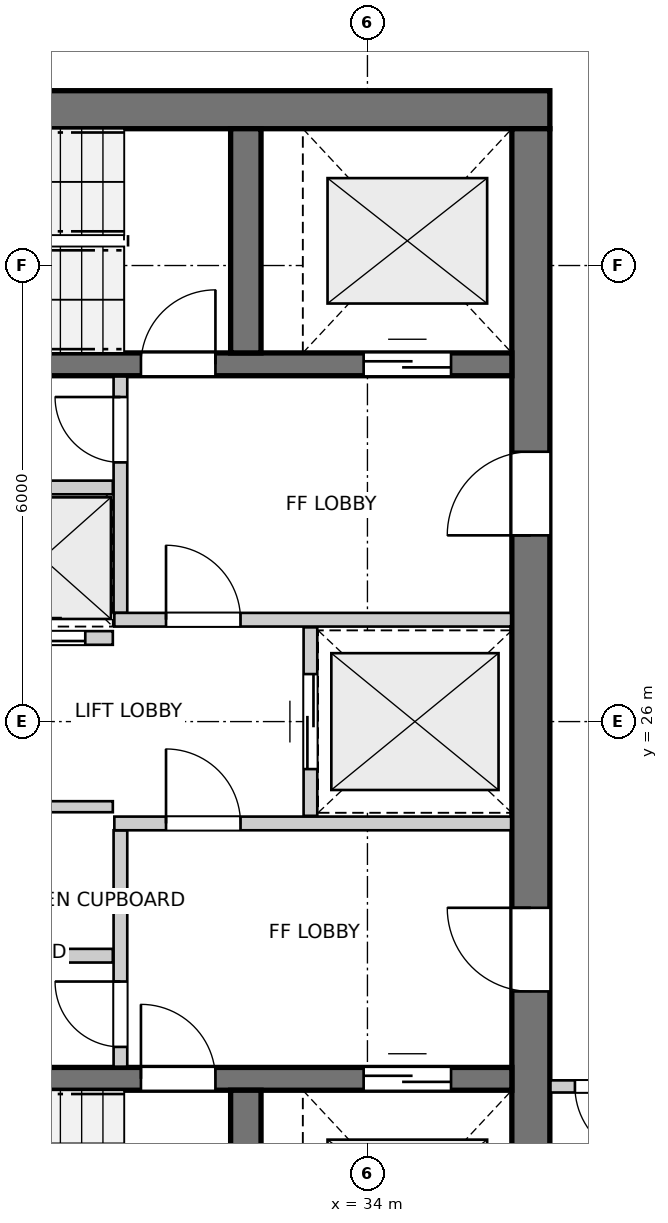
"""IFC4 building model, lengths in metres.
Left out: names, types, materials, properties, quantities, classifications, styles, units other than length and angle.
Written with IfcOpenShell. Run it as: python <this file> out.ifc"""

import sys

from ifc_helpers import new_model, si_unit, direction, frame, frame_2d, origin, place, context, subcontext, project, spatial, rectangle, extrude, source, transform, mapped, element, fill, save


model = new_model("IFC4")
c1 = context("Model", 3, precision=1e-05, world=origin(), true_north=direction((0.0, 1.0)))
c2 = subcontext(c1, "Body", "Model", "MODEL_VIEW")
j1 = project(units=[si_unit("LENGTHUNIT", "METRE"), si_unit("PLANEANGLEUNIT", "RADIAN")], contexts=[c1])
p1 = place(None, origin())
s1 = spatial("IfcSite", under=j1, at=p1, CompositionType="ELEMENT")
p2 = place(p1, origin())
s2 = spatial("IfcBuilding", under=s1, at=p2, CompositionType="ELEMENT")
p3 = place(p2, frame((0.0, 0.0, 227.6)))
s3 = spatial("IfcBuildingStorey", under=s2, at=p3, CompositionType="ELEMENT", Elevation=227.6)
p4 = place(p3, frame((36.4, 34.05, 0.0), z_axis=(0.0, 0.0, 1.0), x_axis=(-1.0, 0.0, 0.0)))
e1 = element("IfcWall", 1, at=p4, inside=s3, PredefinedType="SHEAR", context=c2, shape_type="SweptSolid", body=[
    extrude(rectangle(XDim=12.1, YDim=0.5, at=frame_2d((6.05, 0.0))), origin(), (0.0, 0.0, 1.0), 2.96),
])
p5 = place(p3, frame((36.15, 18.2, 0.0), z_axis=(0.0, 0.0, 1.0), x_axis=(0.0, 1.0, 0.0)))
e2 = element("IfcWall", 2, at=p5, inside=s3, PredefinedType="SHEAR", context=c2, shape_type="SweptSolid", body=[
    extrude(rectangle(XDim=15.6, YDim=0.5, at=frame_2d((7.8, 0.0))), origin(), (0.0, 0.0, 1.0), 2.96),
])
p6 = place(p5, frame((4.25, 0.0, 0.0)))
e3 = element("IfcOpeningElement", 3, at=p6, cuts=e2, PredefinedType="OPENING", context=c2, shape_type="SweptSolid", body=[
    extrude(rectangle(XDim=1.1, YDim=2.15, at=frame_2d((0.55, 1.075))), frame((0.0, 0.26, 0.0), z_axis=(0.0, -1.0, 0.0), x_axis=(1.0, 0.0, 0.0)), (0.0, 0.0, 1.0), 0.52),
])
p7 = place(p5, frame((10.25, 0.0, 0.0)))
e4 = element("IfcOpeningElement", 4, at=p7, cuts=e2, PredefinedType="OPENING", context=c2, shape_type="SweptSolid", body=[
    extrude(rectangle(XDim=1.1, YDim=2.15, at=frame_2d((0.55, 1.075))), frame((0.0, 0.26, 0.0), z_axis=(0.0, -1.0, 0.0), x_axis=(1.0, 0.0, 0.0)), (0.0, 0.0, 1.0), 0.52),
])
p8 = place(p3, frame((24.8, 21.3, 0.0), z_axis=(0.0, 0.0, 1.0), x_axis=(1.0, 0.0, 0.0)))
e5 = element("IfcWall", 5, at=p8, inside=s3, PredefinedType="SHEAR", context=c2, shape_type="SweptSolid", body=[
    extrude(rectangle(XDim=11.1, YDim=0.3, at=frame_2d((5.55, 0.0))), origin(), (0.0, 0.0, 1.0), 2.96),
])
p9 = place(p8, frame((6.22, 0.0, 0.0)))
e6 = element("IfcOpeningElement", 6, at=p9, cuts=e5, PredefinedType="OPENING", context=c2, shape_type="SweptSolid", body=[
    extrude(rectangle(XDim=0.98, YDim=2.15, at=frame_2d((0.49, 1.075))), frame((0.0, 0.16, 0.0), z_axis=(0.0, -1.0, 0.0), x_axis=(1.0, 0.0, 0.0)), (0.0, 0.0, 1.0), 0.32),
])
p10 = place(p8, frame((9.15, 0.0, 0.0)))
e7 = element("IfcOpeningElement", 7, at=p10, cuts=e5, PredefinedType="OPENING", context=c2, shape_type="SweptSolid", body=[
    extrude(rectangle(XDim=1.15, YDim=2.15, at=frame_2d((0.575, 1.075))), frame((0.0, 0.16, 0.0), z_axis=(0.0, -1.0, 0.0), x_axis=(1.0, 0.0, 0.0)), (0.0, 0.0, 1.0), 0.32),
])
p11 = place(p3, frame((32.4, 18.2, 0.0), z_axis=(0.0, 0.0, 1.0), x_axis=(0.0, 1.0, 0.0)))
e8 = element("IfcWall", 8, at=p11, inside=s3, PredefinedType="SHEAR", context=c2, shape_type="SweptSolid", body=[
    extrude(rectangle(XDim=2.95, YDim=0.4, at=frame_2d((1.475, 0.0))), origin(), (0.0, 0.0, 1.0), 2.96),
])
p12 = place(p3, frame((24.8, 30.7, 0.0), z_axis=(0.0, 0.0, 1.0), x_axis=(1.0, 0.0, 0.0)))
e9 = element("IfcWall", 9, at=p12, inside=s3, PredefinedType="SHEAR", context=c2, shape_type="SweptSolid", body=[
    extrude(rectangle(XDim=11.1, YDim=0.3, at=frame_2d((5.55, 0.0))), origin(), (0.0, 0.0, 1.0), 2.96),
])
p13 = place(p12, frame((6.22, 0.0, 0.0)))
e10 = element("IfcOpeningElement", 10, at=p13, cuts=e9, PredefinedType="OPENING", context=c2, shape_type="SweptSolid", body=[
    extrude(rectangle(XDim=0.98, YDim=2.15, at=frame_2d((0.49, 1.075))), frame((0.0, 0.16, 0.0), z_axis=(0.0, -1.0, 0.0), x_axis=(1.0, 0.0, 0.0)), (0.0, 0.0, 1.0), 0.32),
])
p14 = place(p12, frame((9.15, 0.0, 0.0)))
e11 = element("IfcOpeningElement", 11, at=p14, cuts=e9, PredefinedType="OPENING", context=c2, shape_type="SweptSolid", body=[
    extrude(rectangle(XDim=1.15, YDim=2.15, at=frame_2d((0.575, 1.075))), frame((0.0, 0.16, 0.0), z_axis=(0.0, -1.0, 0.0), x_axis=(1.0, 0.0, 0.0)), (0.0, 0.0, 1.0), 0.32),
])
p15 = place(p3, frame((32.4, 30.85, 0.0), z_axis=(0.0, 0.0, 1.0), x_axis=(0.0, 1.0, 0.0)))
e12 = element("IfcWall", 12, at=p15, inside=s3, PredefinedType="SHEAR", context=c2, shape_type="SweptSolid", body=[
    extrude(rectangle(XDim=2.95, YDim=0.4, at=frame_2d((1.475, 0.0))), origin(), (0.0, 0.0, 1.0), 2.96),
])
p16 = place(p3, frame((30.75, 21.46, 0.0), z_axis=(0.0, 0.0, 1.0), x_axis=(0.0, 1.0, 0.0)))
e13 = element("IfcWall", 13, at=p16, inside=s3, PredefinedType="PARTITIONING", context=c2, shape_type="SweptSolid", body=[
    extrude(rectangle(XDim=3.11, YDim=0.18, at=frame_2d((1.555, 0.0))), origin(), (0.0, 0.0, 1.0), 2.96),
])
p17 = place(p16, frame((0.26, 0.0, 0.0)))
e14 = element("IfcOpeningElement", 14, at=p17, cuts=e13, PredefinedType="OPENING", context=c2, shape_type="SweptSolid", body=[
    extrude(rectangle(XDim=0.86, YDim=2.05, at=frame_2d((0.43, 1.025))), frame((0.0, 0.1, 0.0), z_axis=(0.0, -1.0, 0.0), x_axis=(1.0, 0.0, 0.0)), (0.0, 0.0, 1.0), 0.2),
])
p18 = place(p3, frame((30.67, 24.66, 0.0), z_axis=(0.0, 0.0, 1.0), x_axis=(1.0, 0.0, 0.0)))
e15 = element("IfcWall", 15, at=p18, inside=s3, PredefinedType="PARTITIONING", context=c2, shape_type="SweptSolid", body=[
    extrude(rectangle(XDim=5.22, YDim=0.18, at=frame_2d((2.61, 0.0))), origin(), (0.0, 0.0, 1.0), 2.96),
])
p19 = place(p18, frame((0.68, 0.0, 0.0)))
e16 = element("IfcOpeningElement", 16, at=p19, cuts=e15, PredefinedType="OPENING", context=c2, shape_type="SweptSolid", body=[
    extrude(rectangle(XDim=0.98, YDim=2.15, at=frame_2d((0.49, 1.075))), frame((0.0, 0.1, 0.0), z_axis=(0.0, -1.0, 0.0), x_axis=(1.0, 0.0, 0.0)), (0.0, 0.0, 1.0), 0.2),
])
p20 = place(p3, frame((30.75, 27.43, 0.0), z_axis=(0.0, 0.0, 1.0), x_axis=(0.0, 1.0, 0.0)))
e17 = element("IfcWall", 17, at=p20, inside=s3, PredefinedType="PARTITIONING", context=c2, shape_type="SweptSolid", body=[
    extrude(rectangle(XDim=3.11, YDim=0.18, at=frame_2d((1.555, 0.0))), origin(), (0.0, 0.0, 1.0), 2.96),
])
p21 = place(p20, frame((1.98, 0.0, 0.0)))
e18 = element("IfcOpeningElement", 18, at=p21, cuts=e17, PredefinedType="OPENING", context=c2, shape_type="SweptSolid", body=[
    extrude(rectangle(XDim=0.86, YDim=2.05, at=frame_2d((0.43, 1.025))), frame((0.0, 0.1, 0.0), z_axis=(0.0, -1.0, 0.0), x_axis=(1.0, 0.0, 0.0)), (0.0, 0.0, 1.0), 0.2),
])
p22 = place(p3, frame((30.67, 27.34, 0.0), z_axis=(0.0, 0.0, 1.0), x_axis=(1.0, 0.0, 0.0)))
e19 = element("IfcWall", 19, at=p22, inside=s3, PredefinedType="PARTITIONING", context=c2, shape_type="SweptSolid", body=[
    extrude(rectangle(XDim=5.22, YDim=0.18, at=frame_2d((2.61, 0.0))), origin(), (0.0, 0.0, 1.0), 2.96),
])
p23 = place(p22, frame((0.68, 0.0, 0.0)))
e20 = element("IfcOpeningElement", 20, at=p23, cuts=e19, PredefinedType="OPENING", context=c2, shape_type="SweptSolid", body=[
    extrude(rectangle(XDim=0.98, YDim=2.15, at=frame_2d((0.49, 1.075))), frame((0.0, 0.1, 0.0), z_axis=(0.0, -1.0, 0.0), x_axis=(1.0, 0.0, 0.0)), (0.0, 0.0, 1.0), 0.2),
])
p24 = place(p3, frame((33.25, 24.76, 0.0), z_axis=(0.0, 0.0, 1.0), x_axis=(0.0, 1.0, 0.0)))
e21 = element("IfcWall", 21, at=p24, inside=s3, PredefinedType="PARTITIONING", context=c2, shape_type="SweptSolid", body=[
    extrude(rectangle(XDim=2.48, YDim=0.18, at=frame_2d((1.24, 0.0))), origin(), (0.0, 0.0, 1.0), 2.96),
])
p25 = place(p24, frame((0.615, 0.0, 0.0)))
e22 = element("IfcOpeningElement", 22, at=p25, cuts=e21, PredefinedType="OPENING", context=c2, shape_type="SweptSolid", body=[
    extrude(rectangle(XDim=1.25, YDim=2.15, at=frame_2d((0.625, 1.075))), frame((0.0, 0.1, 0.0), z_axis=(0.0, -1.0, 0.0), x_axis=(1.0, 0.0, 0.0)), (0.0, 0.0, 1.0), 0.2),
])
p26 = place(p3, frame((24.81, 22.92, 0.0), z_axis=(0.0, 0.0, 1.0), x_axis=(1.0, 0.0, 0.0)))
e23 = element("IfcWall", 23, at=p26, inside=s3, PredefinedType="PARTITIONING", context=c2, shape_type="SweptSolid", body=[
    extrude(rectangle(XDim=5.84, YDim=0.18, at=frame_2d((2.92, 0.0))), origin(), (0.0, 0.0, 1.0), 2.96),
])
p27 = place(p3, frame((28.13, 24.88, 0.0), z_axis=(0.0, 0.0, 1.0), x_axis=(1.0, 0.0, 0.0)))
e24 = element("IfcWall", 24, at=p27, inside=s3, PredefinedType="PARTITIONING", context=c2, shape_type="SweptSolid", body=[
    extrude(rectangle(XDim=2.52, YDim=0.145, at=frame_2d((1.26, 0.0))), origin(), (0.0, 0.0, 1.0), 2.96),
])
p28 = place(p27, frame((0.82, 0.0, 0.0)))
e25 = element("IfcOpeningElement", 25, at=p28, cuts=e24, PredefinedType="OPENING", context=c2, shape_type="SweptSolid", body=[
    extrude(rectangle(XDim=0.86, YDim=2.05, at=frame_2d((0.43, 1.025))), frame((0.0, 0.083, 0.0), z_axis=(0.0, -1.0, 0.0), x_axis=(1.0, 0.0, 0.0)), (0.0, 0.0, 1.0), 0.165),
])
p29 = place(p3, frame((24.81, 29.08, 0.0), z_axis=(0.0, 0.0, 1.0), x_axis=(1.0, 0.0, 0.0)))
e26 = element("IfcWall", 26, at=p29, inside=s3, PredefinedType="PARTITIONING", context=c2, shape_type="SweptSolid", body=[
    extrude(rectangle(XDim=5.84, YDim=0.18, at=frame_2d((2.92, 0.0))), origin(), (0.0, 0.0, 1.0), 2.96),
])
p30 = place(p3, frame((28.825, 27.1, 0.0), z_axis=(0.0, 0.0, 1.0), x_axis=(1.0, 0.0, 0.0)))
e27 = element("IfcWall", 27, at=p30, inside=s3, PredefinedType="PARTITIONING", context=c2, shape_type="SweptSolid", body=[
    extrude(rectangle(XDim=1.825, YDim=0.18, at=frame_2d((0.913, 0.0))), origin(), (0.0, 0.0, 1.0), 2.96),
])
p31 = place(p30, frame((0.363, 0.0, 0.0)))
e28 = element("IfcOpeningElement", 28, at=p31, cuts=e27, PredefinedType="OPENING", context=c2, shape_type="SweptSolid", body=[
    extrude(rectangle(XDim=1.1, YDim=2.15, at=frame_2d((0.55, 1.075))), frame((0.0, 0.1, 0.0), z_axis=(0.0, -1.0, 0.0), x_axis=(1.0, 0.0, 0.0)), (0.0, 0.0, 1.0), 0.2),
])
p32 = place(p3, frame((38.02, 21.2, 0.0), z_axis=(0.0, 0.0, 1.0), x_axis=(-1.0, 0.0, 0.0)))
e29 = element("IfcWall", 29, at=p32, inside=s3, PredefinedType="PARTITIONING", context=c2, shape_type="SweptSolid", body=[
    extrude(rectangle(XDim=1.612, YDim=0.16, at=frame_2d((0.806, 0.0))), origin(), (0.0, 0.0, 1.0), 2.96),
])
p33 = place(p32, frame((0.33, 0.0, 0.0)))
e30 = element("IfcOpeningElement", 30, at=p33, cuts=e29, PredefinedType="OPENING", context=c2, shape_type="SweptSolid", body=[
    extrude(rectangle(XDim=0.96, YDim=2.1, at=frame_2d((0.48, 1.05))), frame((0.0, 0.09, 0.0), z_axis=(0.0, -1.0, 0.0), x_axis=(1.0, 0.0, 0.0)), (0.0, 0.0, 1.0), 0.18),
])
m1 = source(origin(), c2, "Body", "SweptSolid", [
    extrude(rectangle(XDim=0.98, YDim=2.15, at=frame_2d((0.49, 1.075))), frame((0.0, 0.025, 0.0), z_axis=(0.0, -1.0, 0.0), x_axis=(1.0, 0.0, 0.0)), (0.0, 0.0, 1.0), 0.05),
])
p34 = place(p9, origin())
e31 = element("IfcDoor", 31, at=p34, inside=s3, OperationType="SINGLE_SWING_LEFT", PredefinedType="DOOR", context=c2, shape_type="MappedRepresentation", body=[
    mapped(m1, transform((0.0, 0.0, 0.0), x_axis=(1.0, 0.0, 0.0), y_axis=(0.0, 1.0, 0.0), z_axis=(0.0, 0.0, 1.0), scale=1.0)),
])
fill(e6, e31)
m2 = source(origin(), c2, "Body", "SweptSolid", [
    extrude(rectangle(XDim=1.15, YDim=2.15, at=frame_2d((0.575, 1.075))), frame((0.0, 0.025, 0.0), z_axis=(0.0, -1.0, 0.0), x_axis=(1.0, 0.0, 0.0)), (0.0, 0.0, 1.0), 0.05),
])
p35 = place(p10, origin())
e32 = element("IfcDoor", 32, at=p35, inside=s3, OperationType="DOUBLE_DOOR_SLIDING", PredefinedType="DOOR", context=c2, shape_type="MappedRepresentation", body=[
    mapped(m2, transform((0.0, 0.0, 0.0), x_axis=(1.0, 0.0, 0.0), y_axis=(0.0, 1.0, 0.0), z_axis=(0.0, 0.0, 1.0), scale=1.0)),
])
fill(e7, e32)
p36 = place(p13, origin())
e33 = element("IfcDoor", 33, at=p36, inside=s3, OperationType="SINGLE_SWING_RIGHT", PredefinedType="DOOR", context=c2, shape_type="MappedRepresentation", body=[
    mapped(m1, transform((0.0, 0.0, 0.0), x_axis=(1.0, 0.0, 0.0), y_axis=(0.0, 1.0, 0.0), z_axis=(0.0, 0.0, 1.0), scale=1.0)),
])
fill(e10, e33)
p37 = place(p14, origin())
e34 = element("IfcDoor", 34, at=p37, inside=s3, OperationType="DOUBLE_DOOR_SLIDING", PredefinedType="DOOR", context=c2, shape_type="MappedRepresentation", body=[
    mapped(m2, transform((0.0, 0.0, 0.0), x_axis=(1.0, 0.0, 0.0), y_axis=(0.0, 1.0, 0.0), z_axis=(0.0, 0.0, 1.0), scale=1.0)),
])
fill(e11, e34)
m3 = source(origin(), c2, "Body", "SweptSolid", [
    extrude(rectangle(XDim=1.1, YDim=2.15, at=frame_2d((0.55, 1.075))), frame((0.0, 0.025, 0.0), z_axis=(0.0, -1.0, 0.0), x_axis=(1.0, 0.0, 0.0)), (0.0, 0.0, 1.0), 0.05),
])
p38 = place(p6, origin())
e35 = element("IfcDoor", 35, at=p38, inside=s3, OperationType="SINGLE_SWING_RIGHT", PredefinedType="DOOR", context=c2, shape_type="MappedRepresentation", body=[
    mapped(m3, transform((0.0, 0.0, 0.0), x_axis=(1.0, 0.0, 0.0), y_axis=(0.0, 1.0, 0.0), z_axis=(0.0, 0.0, 1.0), scale=1.0)),
])
fill(e3, e35)
p39 = place(p7, origin())
e36 = element("IfcDoor", 36, at=p39, inside=s3, OperationType="SINGLE_SWING_LEFT", PredefinedType="DOOR", context=c2, shape_type="MappedRepresentation", body=[
    mapped(m3, transform((0.0, 0.0, 0.0), x_axis=(1.0, 0.0, 0.0), y_axis=(0.0, 1.0, 0.0), z_axis=(0.0, 0.0, 1.0), scale=1.0)),
])
fill(e4, e36)
m4 = source(origin(), c2, "Body", "SweptSolid", [
    extrude(rectangle(XDim=0.86, YDim=2.05, at=frame_2d((0.43, 1.025))), frame((0.0, 0.025, 0.0), z_axis=(0.0, -1.0, 0.0), x_axis=(1.0, 0.0, 0.0)), (0.0, 0.0, 1.0), 0.05),
])
p40 = place(p17, origin())
e37 = element("IfcDoor", 37, at=p40, inside=s3, OperationType="SINGLE_SWING_RIGHT", PredefinedType="DOOR", context=c2, shape_type="MappedRepresentation", body=[
    mapped(m4, transform((0.0, 0.0, 0.0), x_axis=(1.0, 0.0, 0.0), y_axis=(0.0, 1.0, 0.0), z_axis=(0.0, 0.0, 1.0), scale=1.0)),
])
fill(e14, e37)
p41 = place(p19, origin())
e38 = element("IfcDoor", 38, at=p41, inside=s3, OperationType="SINGLE_SWING_LEFT", PredefinedType="DOOR", context=c2, shape_type="MappedRepresentation", body=[
    mapped(m1, transform((0.0, 0.0, 0.0), x_axis=(1.0, 0.0, 0.0), y_axis=(0.0, 1.0, 0.0), z_axis=(0.0, 0.0, 1.0), scale=1.0)),
])
fill(e16, e38)
p42 = place(p21, origin())
e39 = element("IfcDoor", 39, at=p42, inside=s3, OperationType="SINGLE_SWING_RIGHT", PredefinedType="DOOR", context=c2, shape_type="MappedRepresentation", body=[
    mapped(m4, transform((0.0, 0.0, 0.0), x_axis=(1.0, 0.0, 0.0), y_axis=(0.0, 1.0, 0.0), z_axis=(0.0, 0.0, 1.0), scale=1.0)),
])
fill(e18, e39)
p43 = place(p23, origin())
e40 = element("IfcDoor", 40, at=p43, inside=s3, OperationType="SINGLE_SWING_LEFT", PredefinedType="DOOR", context=c2, shape_type="MappedRepresentation", body=[
    mapped(m1, transform((0.0, 0.0, 0.0), x_axis=(1.0, 0.0, 0.0), y_axis=(0.0, 1.0, 0.0), z_axis=(0.0, 0.0, 1.0), scale=1.0)),
])
fill(e20, e40)
m5 = source(origin(), c2, "Body", "SweptSolid", [
    extrude(rectangle(XDim=1.25, YDim=2.15, at=frame_2d((0.625, 1.075))), frame((0.0, 0.025, 0.0), z_axis=(0.0, -1.0, 0.0), x_axis=(1.0, 0.0, 0.0)), (0.0, 0.0, 1.0), 0.05),
])
p44 = place(p25, origin())
e41 = element("IfcDoor", 41, at=p44, inside=s3, OperationType="DOUBLE_DOOR_SLIDING", PredefinedType="DOOR", context=c2, shape_type="MappedRepresentation", body=[
    mapped(m5, transform((0.0, 0.0, 0.0), x_axis=(1.0, 0.0, 0.0), y_axis=(0.0, 1.0, 0.0), z_axis=(0.0, 0.0, 1.0), scale=1.0)),
])
fill(e22, e41)
p45 = place(p31, origin())
e42 = element("IfcDoor", 42, at=p45, inside=s3, OperationType="DOUBLE_DOOR_SLIDING", PredefinedType="DOOR", context=c2, shape_type="MappedRepresentation", body=[
    mapped(m3, transform((0.0, 0.0, 0.0), x_axis=(1.0, 0.0, 0.0), y_axis=(0.0, 1.0, 0.0), z_axis=(0.0, 0.0, 1.0), scale=1.0)),
])
fill(e28, e42)
m6 = source(origin(), c2, "Body", "SweptSolid", [
    extrude(rectangle(XDim=0.96, YDim=2.1, at=frame_2d((0.48, 1.05))), frame((0.0, 0.025, 0.0), z_axis=(0.0, -1.0, 0.0), x_axis=(1.0, 0.0, 0.0)), (0.0, 0.0, 1.0), 0.05),
])
p46 = place(p33, origin())
e43 = element("IfcDoor", 43, at=p46, inside=s3, OperationType="SINGLE_SWING_LEFT", PredefinedType="DOOR", context=c2, shape_type="MappedRepresentation", body=[
    mapped(m6, transform((0.0, 0.0, 0.0), x_axis=(1.0, 0.0, 0.0), y_axis=(0.0, 1.0, 0.0), z_axis=(0.0, 0.0, 1.0), scale=1.0)),
])
fill(e30, e43)
save(model, sys.argv[1])
